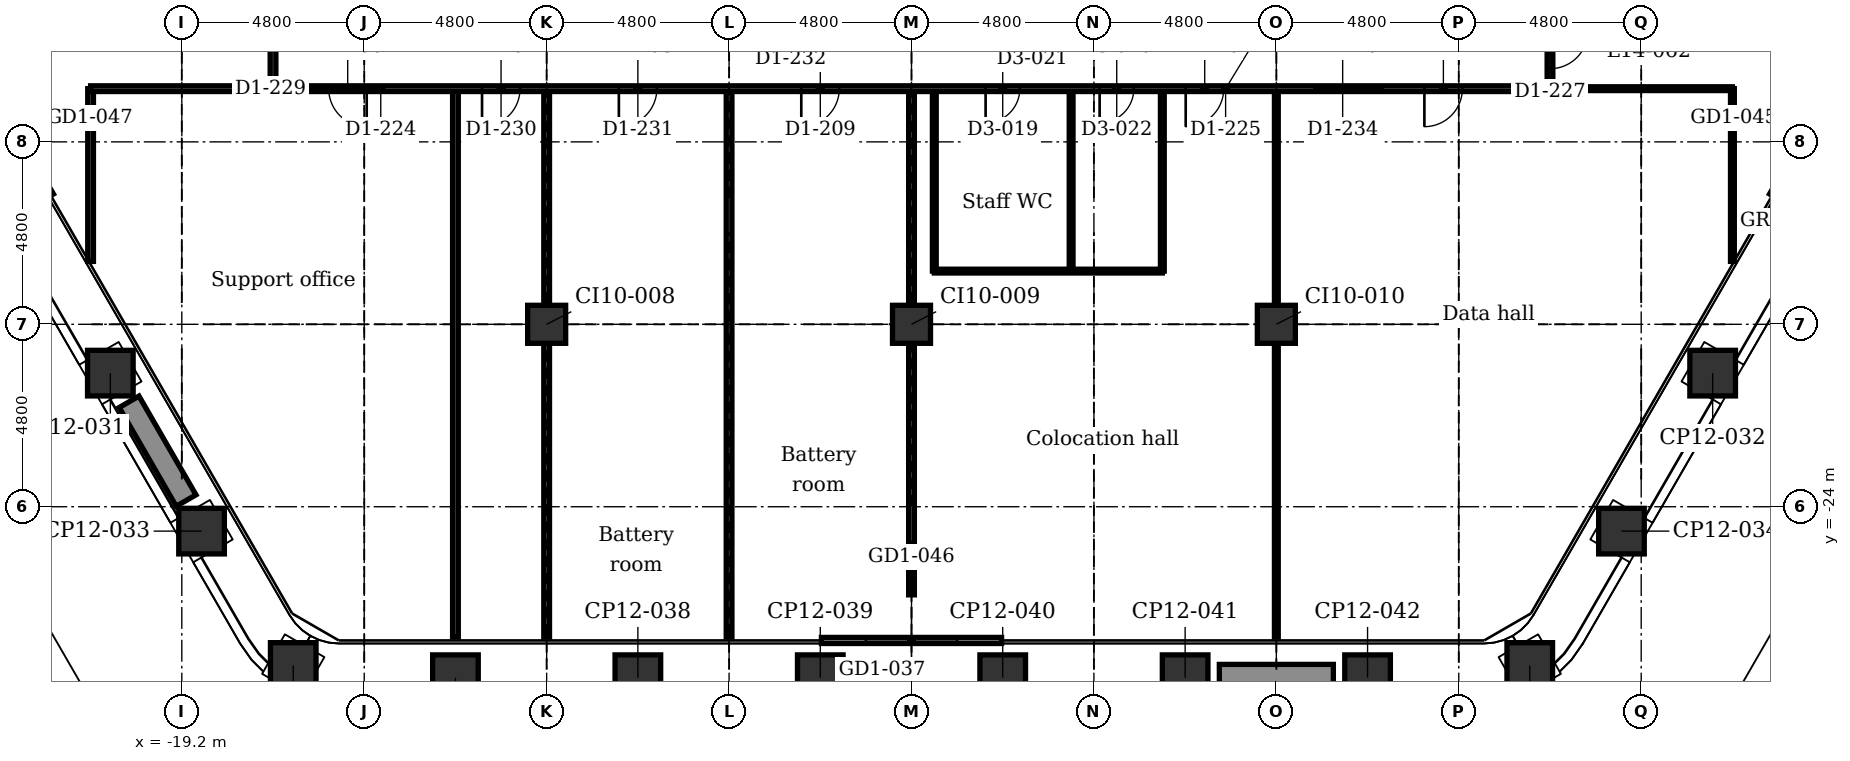
"""IFC4 building model, lengths in metres.
Left out: names, types, materials, properties, quantities, classifications, styles, units other than length and angle.
Written with IfcOpenShell. Run it as: python <this file> out.ifc"""

import sys

from ifc_helpers import new_model, si_unit, direction, frame, frame_2d, origin, origin_2d, place, context, subcontext, project, spatial, rectangle, extrude, element, fill, save


model = new_model("IFC4")
c1 = context("Model", 3, precision=1e-05, world=origin(), true_north=direction((0.0, 1.0)))
c2 = subcontext(c1, "Body", "Model", "MODEL_VIEW")
j1 = project(units=[si_unit("LENGTHUNIT", "METRE"), si_unit("PLANEANGLEUNIT", "RADIAN")], contexts=[c1])
p1 = place(None, origin())
s1 = spatial("IfcSite", under=j1, at=p1, CompositionType="ELEMENT")
p2 = place(p1, origin())
s2 = spatial("IfcBuilding", under=s1, at=p2, CompositionType="ELEMENT")
p3 = place(p2, frame((0.0, 0.0, 77.9)))
s3 = spatial("IfcBuildingStorey", under=s2, at=p3, CompositionType="ELEMENT", Elevation=77.9)
for number, where, z_axis, x_axis in (
    (1, (21.08, -20.485, -0.2), (0.0, 0.0, 1.0), (0.5, 0.866, 0.0)),
    (2, (18.68, -24.642, -0.2), (0.0, 0.0, 1.0), (0.5, 0.866, 0.0)),
    (3, (16.268, -28.177, -0.2), (0.0, 0.0, 1.0), (0.866, 0.5, 0.0)),
    (4, (12.0, -28.499, -0.2), (0.0, 0.0, 1.0), (1.0, 0.0, 0.0)),
    (5, (7.2, -28.499, -0.2), (0.0, 0.0, 1.0), (1.0, 0.0, 0.0)),
    (6, (2.4, -28.499, -0.2), (0.0, 0.0, 1.0), (1.0, 0.0, 0.0)),
    (7, (-2.4, -28.499, -0.2), (0.0, 0.0, 1.0), (1.0, 0.0, 0.0)),
    (8, (-7.2, -28.499, -0.2), (0.0, 0.0, 1.0), (1.0, 0.0, 0.0)),
    (9, (-12.0, -28.499, -0.2), (0.0, 0.0, 1.0), (1.0, 0.0, 0.0)),
    (10, (-16.268, -28.177, -0.2), (0.0, 0.0, 1.0), (0.5, 0.866, 0.0)),
    (11, (-18.68, -24.642, -0.2), (0.0, 0.0, 1.0), (0.866, 0.5, 0.0)),
    (12, (-21.08, -20.485, -0.2), (0.0, 0.0, 1.0), (0.866, 0.5, 0.0)),
):
    element("IfcColumn", number, at=place(p3, frame(where, z_axis=z_axis, x_axis=x_axis)), inside=s3, PredefinedType="COLUMN", context=c2, shape_type="SweptSolid", body=[
        extrude(rectangle(XDim=1.2, YDim=1.2, at=origin_2d()), origin(), (0.0, 0.0, 1.0), 4.5),
    ])
for number, where, z_axis, x_axis in (
    (13, (-9.6, -19.2, -0.2), (0.0, 0.0, 1.0), (1.0, 0.0, 0.0)),
    (14, (0.0, -19.2, -0.2), (0.0, 0.0, 1.0), (1.0, 0.0, 0.0)),
    (15, (9.6, -19.2, -0.2), (0.0, 0.0, 1.0), (1.0, 0.0, 0.0)),
):
    element("IfcColumn", number, at=place(p3, frame(where, z_axis=z_axis, x_axis=x_axis)), inside=s3, PredefinedType="COLUMN", context=c2, shape_type="SweptSolid", body=[
        extrude(rectangle(XDim=1.0, YDim=1.0, at=origin_2d()), origin(), (0.0, 0.0, 1.0), 4.5),
    ])
p4 = place(p3, frame((25.017, -11.707, 0.0), z_axis=(0.0, 0.0, 1.0), x_axis=(-0.499978080042, -0.866038058908, 0.0)))
e16 = element("IfcWall", 16, at=p4, inside=s3, PredefinedType="PARTITIONING", context=c2, shape_type="SweptSolid", body=[
    extrude(rectangle(XDim=4.74, YDim=0.16, at=frame_2d((2.37, 0.0))), origin(), (0.0, 0.0, 1.0), 4.3),
])
p5 = place(p4, frame((1.17, 0.0, 0.0)))
e17 = element("IfcOpeningElement", 17, at=p5, cuts=e16, PredefinedType="OPENING", context=c2, shape_type="SweptSolid", body=[
    extrude(rectangle(XDim=2.4, YDim=2.4, at=frame_2d((1.2, 1.2))), frame((0.0, 0.09, 0.0), z_axis=(0.0, -1.0, 0.0), x_axis=(1.0, 0.0, 0.0)), (0.0, 0.0, 1.0), 0.18),
])
p6 = place(p3, frame((2.37, -27.519, 0.0), z_axis=(0.0, 0.0, 1.0), x_axis=(-1.0, 0.0, 0.0)))
e18 = element("IfcWall", 18, at=p6, inside=s3, PredefinedType="PARTITIONING", context=c2, shape_type="SweptSolid", body=[
    extrude(rectangle(XDim=4.74, YDim=0.16, at=frame_2d((2.37, 0.0))), origin(), (0.0, 0.0, 1.0), 4.3),
])
p7 = place(p6, frame((1.17, 0.0, 0.0)))
e19 = element("IfcOpeningElement", 19, at=p7, cuts=e18, PredefinedType="OPENING", context=c2, shape_type="SweptSolid", body=[
    extrude(rectangle(XDim=2.4, YDim=2.4, at=frame_2d((1.2, 1.2))), frame((0.0, 0.09, 0.0), z_axis=(0.0, -1.0, 0.0), x_axis=(1.0, 0.0, 0.0)), (0.0, 0.0, 1.0), 0.18),
])
p8 = place(p3, frame((-22.647, -15.812, 0.0), z_axis=(0.0, 0.0, 1.0), x_axis=(-0.499978080042, 0.866038058908, 0.0)))
e20 = element("IfcWall", 20, at=p8, inside=s3, PredefinedType="PARTITIONING", context=c2, shape_type="SweptSolid", body=[
    extrude(rectangle(XDim=4.74, YDim=0.16, at=frame_2d((2.37, 0.0))), origin(), (0.0, 0.0, 1.0), 4.3),
])
p9 = place(p8, frame((1.17, 0.0, 0.0)))
e21 = element("IfcOpeningElement", 21, at=p9, cuts=e20, PredefinedType="OPENING", context=c2, shape_type="SweptSolid", body=[
    extrude(rectangle(XDim=2.4, YDim=2.4, at=frame_2d((1.2, 1.2))), frame((0.0, 0.09, 0.0), z_axis=(0.0, -1.0, 0.0), x_axis=(1.0, 0.0, 0.0)), (0.0, 0.0, 1.0), 0.18),
])
for number, where, z_axis, x_axis in (
    (22, (11.1, -28.448, 0.0), (0.0, 0.0, 1.0), (-1.0, 0.0, 0.0)),
    (23, (-19.087, -23.837, 0.0), (0.0, 0.0, 1.0), (-0.5, 0.866, 0.0)),
):
    element("IfcWall", number, at=place(p3, frame(where, z_axis=z_axis, x_axis=x_axis)), inside=s3, PredefinedType="USERDEFINED", context=c2, shape_type="SweptSolid", body=[
        extrude(rectangle(XDim=3.0, YDim=0.6, at=frame_2d((1.5, 0.0))), origin(), (0.0, 0.0, 1.0), 0.7),
    ])
p10 = place(p3, frame((21.6, -17.545, 0.0), z_axis=(0.0, 0.0, 1.0), x_axis=(0.0, 1.0, 0.0)))
e24 = element("IfcWall", 24, at=p10, inside=s3, PredefinedType="PARTITIONING", context=c2, shape_type="SweptSolid", body=[
    extrude(rectangle(XDim=4.545, YDim=0.1, at=frame_2d((2.272, 0.0))), origin(), (0.0, 0.0, 1.0), 4.3),
])
p11 = place(p3, frame((16.8, -13.0, 0.0), z_axis=(0.0, 0.0, 1.0), x_axis=(0.0, 1.0, 0.0)))
e25 = element("IfcWall", 25, at=p11, inside=s3, PredefinedType="PARTITIONING", context=c2, shape_type="SweptSolid", body=[
    extrude(rectangle(XDim=9.05, YDim=0.15, at=frame_2d((4.525, 0.0))), origin(), (0.0, 0.0, 1.0), 4.3),
])
p12 = place(p11, frame((0.525, 0.0, 0.0)))
e26 = element("IfcOpeningElement", 26, at=p12, cuts=e25, PredefinedType="OPENING", context=c2, shape_type="SweptSolid", body=[
    extrude(rectangle(XDim=1.0, YDim=2.1, at=frame_2d((0.5, 1.05))), frame((0.0, 0.085, 0.0), z_axis=(0.0, -1.0, 0.0), x_axis=(1.0, 0.0, 0.0)), (0.0, 0.0, 1.0), 0.17),
])
p13 = place(p11, frame((5.8, 0.0, 0.0)))
e27 = element("IfcOpeningElement", 27, at=p13, cuts=e25, PredefinedType="OPENING", context=c2, shape_type="SweptSolid", body=[
    extrude(rectangle(XDim=1.0, YDim=2.1, at=frame_2d((0.5, 1.05))), frame((0.0, 0.085, 0.0), z_axis=(0.0, -1.0, 0.0), x_axis=(1.0, 0.0, 0.0)), (0.0, 0.0, 1.0), 0.17),
])
p14 = place(p3, frame((9.6, -27.428, 0.0), z_axis=(0.0, 0.0, 1.0), x_axis=(0.0, 1.0, 0.0)))
e28 = element("IfcWall", 28, at=p14, inside=s3, PredefinedType="PARTITIONING", context=c2, shape_type="SweptSolid", body=[
    extrude(rectangle(XDim=7.729, YDim=0.1, at=frame_2d((3.864, 0.0))), origin(), (0.0, 0.0, 1.0), 3.843),
])
p15 = place(p3, frame((9.6, -18.7, 0.0), z_axis=(0.0, 0.0, 1.0), x_axis=(0.0, 1.0, 0.0)))
e29 = element("IfcWall", 29, at=p15, inside=s3, PredefinedType="PARTITIONING", context=c2, shape_type="SweptSolid", body=[
    extrude(rectangle(XDim=5.7, YDim=0.1, at=frame_2d((2.85, 0.0))), origin(), (0.0, 0.0, 1.0), 3.843),
])
for number, where, z_axis, x_axis in (
    (30, (6.6, -17.8, 0.0), (0.0, 0.0, 1.0), (0.0, 1.0, 0.0)),
    (31, (4.2, -17.8, 0.0), (0.0, 0.0, 1.0), (0.0, 1.0, 0.0)),
    (32, (0.6, -17.8, 0.0), (0.0, 0.0, 1.0), (0.0, 1.0, 0.0)),
):
    element("IfcWall", number, at=place(p3, frame(where, z_axis=z_axis, x_axis=x_axis)), inside=s3, PredefinedType="PARTITIONING", context=c2, shape_type="SweptSolid", body=[
        extrude(rectangle(XDim=4.8, YDim=0.1, at=frame_2d((2.4, 0.0))), origin(), (0.0, 0.0, 1.0), 4.3),
    ])
p16 = place(p3, frame((0.0, -26.319, 0.0), z_axis=(0.0, 0.0, 1.0), x_axis=(0.0, 1.0, 0.0)))
e33 = element("IfcWall", 33, at=p16, inside=s3, PredefinedType="PARTITIONING", context=c2, shape_type="SweptSolid", body=[
    extrude(rectangle(XDim=6.619, YDim=0.15, at=frame_2d((3.309, 0.0))), origin(), (0.0, 0.0, 1.0), 3.843),
])
p17 = place(p3, frame((0.0, -18.7, 0.0), z_axis=(0.0, 0.0, 1.0), x_axis=(0.0, 1.0, 0.0)))
e34 = element("IfcWall", 34, at=p17, inside=s3, PredefinedType="PARTITIONING", context=c2, shape_type="SweptSolid", body=[
    extrude(rectangle(XDim=5.7, YDim=0.15, at=frame_2d((2.85, 0.0))), origin(), (0.0, 0.0, 1.0), 3.843),
])
p18 = place(p3, frame((-4.8, -27.428, 0.0), z_axis=(0.0, 0.0, 1.0), x_axis=(0.0, 1.0, 0.0)))
e35 = element("IfcWall", 35, at=p18, inside=s3, PredefinedType="PARTITIONING", context=c2, shape_type="SweptSolid", body=[
    extrude(rectangle(XDim=14.428, YDim=0.15, at=frame_2d((7.214, 0.0))), origin(), (0.0, 0.0, 1.0), 3.843),
])
p19 = place(p3, frame((-9.6, -27.428, 0.0), z_axis=(0.0, 0.0, 1.0), x_axis=(0.0, 1.0, 0.0)))
e36 = element("IfcWall", 36, at=p19, inside=s3, PredefinedType="PARTITIONING", context=c2, shape_type="SweptSolid", body=[
    extrude(rectangle(XDim=7.729, YDim=0.15, at=frame_2d((3.864, 0.0))), origin(), (0.0, 0.0, 1.0), 3.843),
])
p20 = place(p3, frame((-9.6, -18.7, 0.0), z_axis=(0.0, 0.0, 1.0), x_axis=(0.0, 1.0, 0.0)))
e37 = element("IfcWall", 37, at=p20, inside=s3, PredefinedType="PARTITIONING", context=c2, shape_type="SweptSolid", body=[
    extrude(rectangle(XDim=5.7, YDim=0.15, at=frame_2d((2.85, 0.0))), origin(), (0.0, 0.0, 1.0), 3.843),
])
p21 = place(p3, frame((-12.0, -27.428, 0.0), z_axis=(0.0, 0.0, 1.0), x_axis=(0.0, 1.0, 0.0)))
e38 = element("IfcWall", 38, at=p21, inside=s3, PredefinedType="PARTITIONING", context=c2, shape_type="SweptSolid", body=[
    extrude(rectangle(XDim=14.428, YDim=0.15, at=frame_2d((7.214, 0.0))), origin(), (0.0, 0.0, 1.0), 4.3),
])
p22 = place(p3, frame((-16.8, -13.0, 0.0), z_axis=(0.0, 0.0, 1.0), x_axis=(0.0, 1.0, 0.0)))
e39 = element("IfcWall", 39, at=p22, inside=s3, PredefinedType="PARTITIONING", context=c2, shape_type="SweptSolid", body=[
    extrude(rectangle(XDim=9.05, YDim=0.15, at=frame_2d((4.525, 0.0))), origin(), (0.0, 0.0, 1.0), 4.3),
])
p23 = place(p22, frame((1.0, 0.0, 0.0)))
e40 = element("IfcOpeningElement", 40, at=p23, cuts=e39, PredefinedType="OPENING", context=c2, shape_type="SweptSolid", body=[
    extrude(rectangle(XDim=1.0, YDim=2.1, at=frame_2d((0.5, 1.05))), frame((0.0, 0.085, 0.0), z_axis=(0.0, -1.0, 0.0), x_axis=(1.0, 0.0, 0.0)), (0.0, 0.0, 1.0), 0.17),
])
p24 = place(p22, frame((5.8, 0.0, 0.0)))
e41 = element("IfcOpeningElement", 41, at=p24, cuts=e39, PredefinedType="OPENING", context=c2, shape_type="SweptSolid", body=[
    extrude(rectangle(XDim=1.0, YDim=2.1, at=frame_2d((0.5, 1.05))), frame((0.0, 0.085, 0.0), z_axis=(0.0, -1.0, 0.0), x_axis=(1.0, 0.0, 0.0)), (0.0, 0.0, 1.0), 0.17),
])
p25 = place(p3, frame((-21.6, -17.545, 0.0), z_axis=(0.0, 0.0, 1.0), x_axis=(0.0, 1.0, 0.0)))
e42 = element("IfcWall", 42, at=p25, inside=s3, PredefinedType="PARTITIONING", context=c2, shape_type="SweptSolid", body=[
    extrude(rectangle(XDim=4.545, YDim=0.15, at=frame_2d((2.272, 0.0))), origin(), (0.0, 0.0, 1.0), 4.3),
])
p26 = place(p3, frame((0.6, -17.8, 0.0), z_axis=(0.0, 0.0, 1.0), x_axis=(1.0, 0.0, 0.0)))
e43 = element("IfcWall", 43, at=p26, inside=s3, PredefinedType="PARTITIONING", context=c2, shape_type="SweptSolid", body=[
    extrude(rectangle(XDim=6.0, YDim=0.1, at=frame_2d((3.0, 0.0))), origin(), (0.0, 0.0, 1.0), 4.3),
])
p27 = place(p3, frame((16.8, -13.0, 0.0), z_axis=(0.0, 0.0, 1.0), x_axis=(1.0, 0.0, 0.0)))
e44 = element("IfcWall", 44, at=p27, inside=s3, PredefinedType="PARTITIONING", context=c2, shape_type="SweptSolid", body=[
    extrude(rectangle(XDim=4.8, YDim=0.1, at=frame_2d((2.4, 0.0))), origin(), (0.0, 0.0, 1.0), 4.3),
])
p28 = place(p3, frame((-21.6, -13.0, 0.0), z_axis=(0.0, 0.0, 1.0), x_axis=(1.0, 0.0, 0.0)))
e45 = element("IfcWall", 45, at=p28, inside=s3, PredefinedType="PARTITIONING", context=c2, shape_type="SweptSolid", body=[
    extrude(rectangle(XDim=38.4, YDim=0.15, at=frame_2d((19.2, 0.0))), origin(), (0.0, 0.0, 1.0), 4.3),
])
p29 = place(p28, frame((6.265, 0.0, 0.0)))
e46 = element("IfcOpeningElement", 46, at=p29, cuts=e45, PredefinedType="OPENING", context=c2, shape_type="SweptSolid", body=[
    extrude(rectangle(XDim=1.0, YDim=2.1, at=frame_2d((0.5, 1.05))), frame((0.0, 0.085, 0.0), z_axis=(0.0, -1.0, 0.0), x_axis=(1.0, 0.0, 0.0)), (0.0, 0.0, 1.0), 0.17),
])
p30 = place(p28, frame((10.3, 0.0, 0.0)))
e47 = element("IfcOpeningElement", 47, at=p30, cuts=e45, PredefinedType="OPENING", context=c2, shape_type="SweptSolid", body=[
    extrude(rectangle(XDim=1.0, YDim=2.1, at=frame_2d((0.5, 1.05))), frame((0.0, 0.085, 0.0), z_axis=(0.0, -1.0, 0.0), x_axis=(1.0, 0.0, 0.0)), (0.0, 0.0, 1.0), 0.17),
])
p31 = place(p28, frame((13.9, 0.0, 0.0)))
e48 = element("IfcOpeningElement", 48, at=p31, cuts=e45, PredefinedType="OPENING", context=c2, shape_type="SweptSolid", body=[
    extrude(rectangle(XDim=1.0, YDim=2.1, at=frame_2d((0.5, 1.05))), frame((0.0, 0.085, 0.0), z_axis=(0.0, -1.0, 0.0), x_axis=(1.0, 0.0, 0.0)), (0.0, 0.0, 1.0), 0.17),
])
p32 = place(p28, frame((18.7, 0.0, 0.0)))
e49 = element("IfcOpeningElement", 49, at=p32, cuts=e45, PredefinedType="OPENING", context=c2, shape_type="SweptSolid", body=[
    extrude(rectangle(XDim=1.0, YDim=2.1, at=frame_2d((0.5, 1.05))), frame((0.0, 0.085, 0.0), z_axis=(0.0, -1.0, 0.0), x_axis=(1.0, 0.0, 0.0)), (0.0, 0.0, 1.0), 0.17),
])
p33 = place(p28, frame((28.815, 0.0, 0.0)))
e50 = element("IfcOpeningElement", 50, at=p33, cuts=e45, PredefinedType="OPENING", context=c2, shape_type="SweptSolid", body=[
    extrude(rectangle(XDim=1.0, YDim=2.1, at=frame_2d((0.5, 1.05))), frame((0.0, 0.085, 0.0), z_axis=(0.0, -1.0, 0.0), x_axis=(1.0, 0.0, 0.0)), (0.0, 0.0, 1.0), 0.17),
])
p34 = place(p28, frame((35.095, 0.0, 0.0)))
e51 = element("IfcOpeningElement", 51, at=p34, cuts=e45, PredefinedType="OPENING", context=c2, shape_type="SweptSolid", body=[
    extrude(rectangle(XDim=1.0, YDim=2.1, at=frame_2d((0.5, 1.05))), frame((0.0, 0.085, 0.0), z_axis=(0.0, -1.0, 0.0), x_axis=(1.0, 0.0, 0.0)), (0.0, 0.0, 1.0), 0.17),
])
p35 = place(p28, frame((23.55, 0.0, 0.0)))
e52 = element("IfcOpeningElement", 52, at=p35, cuts=e45, PredefinedType="OPENING", context=c2, shape_type="SweptSolid", body=[
    extrude(rectangle(XDim=0.9, YDim=2.1, at=frame_2d((0.45, 1.05))), frame((0.0, 0.085, 0.0), z_axis=(0.0, -1.0, 0.0), x_axis=(1.0, 0.0, 0.0)), (0.0, 0.0, 1.0), 0.17),
])
p36 = place(p28, frame((26.55, 0.0, 0.0)))
e53 = element("IfcOpeningElement", 53, at=p36, cuts=e45, PredefinedType="OPENING", context=c2, shape_type="SweptSolid", body=[
    extrude(rectangle(XDim=0.9, YDim=2.1, at=frame_2d((0.45, 1.05))), frame((0.0, 0.085, 0.0), z_axis=(0.0, -1.0, 0.0), x_axis=(1.0, 0.0, 0.0)), (0.0, 0.0, 1.0), 0.17),
])
p37 = place(p28, frame((32.2, 0.0, 0.9)))
e54 = element("IfcOpeningElement", 54, at=p37, cuts=e45, PredefinedType="OPENING", context=c2, shape_type="SweptSolid", body=[
    extrude(rectangle(XDim=1.8, YDim=1.5, at=frame_2d((0.9, 0.75))), frame((0.0, 0.085, 0.0), z_axis=(0.0, -1.0, 0.0), x_axis=(1.0, 0.0, 0.0)), (0.0, 0.0, 1.0), 0.17),
])
p38 = place(p7, origin())
e55 = element("IfcDoor", 55, at=p38, inside=s3, OperationType="DOUBLE_DOOR_SLIDING", PredefinedType="DOOR", context=c2, shape_type="SweptSolid", body=[
    extrude(rectangle(XDim=2.4, YDim=2.4, at=frame_2d((1.2, 1.2))), frame((0.0, 0.025, 0.0), z_axis=(0.0, -1.0, 0.0), x_axis=(1.0, 0.0, 0.0)), (0.0, 0.0, 1.0), 0.05),
])
fill(e19, e55)
p39 = place(p29, frame((1.0, 0.0, 0.0), z_axis=(0.0, 0.0, 1.0), x_axis=(-1.0, 0.0, 0.0)))
e56 = element("IfcDoor", 56, at=p39, inside=s3, OperationType="SINGLE_SWING_RIGHT", PredefinedType="DOOR", context=c2, shape_type="SweptSolid", body=[
    extrude(rectangle(XDim=1.0, YDim=2.1, at=frame_2d((0.5, 1.05))), frame((0.0, 0.025, 0.0), z_axis=(0.0, -1.0, 0.0), x_axis=(1.0, 0.0, 0.0)), (0.0, 0.0, 1.0), 0.05),
])
fill(e46, e56)
p40 = place(p30, frame((1.0, 0.0, 0.0), z_axis=(0.0, 0.0, 1.0), x_axis=(-1.0, 0.0, 0.0)))
e57 = element("IfcDoor", 57, at=p40, inside=s3, OperationType="SINGLE_SWING_LEFT", PredefinedType="DOOR", context=c2, shape_type="SweptSolid", body=[
    extrude(rectangle(XDim=1.0, YDim=2.1, at=frame_2d((0.5, 1.05))), frame((0.0, 0.025, 0.0), z_axis=(0.0, -1.0, 0.0), x_axis=(1.0, 0.0, 0.0)), (0.0, 0.0, 1.0), 0.05),
])
fill(e47, e57)
p41 = place(p31, frame((1.0, 0.0, 0.0), z_axis=(0.0, 0.0, 1.0), x_axis=(-1.0, 0.0, 0.0)))
e58 = element("IfcDoor", 58, at=p41, inside=s3, OperationType="SINGLE_SWING_LEFT", PredefinedType="DOOR", context=c2, shape_type="SweptSolid", body=[
    extrude(rectangle(XDim=1.0, YDim=2.1, at=frame_2d((0.5, 1.05))), frame((0.0, 0.025, 0.0), z_axis=(0.0, -1.0, 0.0), x_axis=(1.0, 0.0, 0.0)), (0.0, 0.0, 1.0), 0.05),
])
fill(e48, e58)
p42 = place(p32, frame((1.0, 0.0, 0.0), z_axis=(0.0, 0.0, 1.0), x_axis=(-1.0, 0.0, 0.0)))
e59 = element("IfcDoor", 59, at=p42, inside=s3, OperationType="SINGLE_SWING_LEFT", PredefinedType="DOOR", context=c2, shape_type="SweptSolid", body=[
    extrude(rectangle(XDim=1.0, YDim=2.1, at=frame_2d((0.5, 1.05))), frame((0.0, 0.025, 0.0), z_axis=(0.0, -1.0, 0.0), x_axis=(1.0, 0.0, 0.0)), (0.0, 0.0, 1.0), 0.05),
])
fill(e49, e59)
p43 = place(p33, frame((1.0, 0.0, 0.0), z_axis=(0.0, 0.0, 1.0), x_axis=(-1.0, 0.0, 0.0)))
e60 = element("IfcDoor", 60, at=p43, inside=s3, OperationType="SINGLE_SWING_LEFT", PredefinedType="DOOR", context=c2, shape_type="SweptSolid", body=[
    extrude(rectangle(XDim=1.0, YDim=2.1, at=frame_2d((0.5, 1.05))), frame((0.0, 0.025, 0.0), z_axis=(0.0, -1.0, 0.0), x_axis=(1.0, 0.0, 0.0)), (0.0, 0.0, 1.0), 0.05),
])
fill(e50, e60)
p44 = place(p34, frame((1.0, 0.0, 0.0), z_axis=(0.0, 0.0, 1.0), x_axis=(-1.0, 0.0, 0.0)))
e61 = element("IfcDoor", 61, at=p44, inside=s3, OperationType="SINGLE_SWING_LEFT", PredefinedType="DOOR", context=c2, shape_type="SweptSolid", body=[
    extrude(rectangle(XDim=1.0, YDim=2.1, at=frame_2d((0.5, 1.05))), frame((0.0, 0.025, 0.0), z_axis=(0.0, -1.0, 0.0), x_axis=(1.0, 0.0, 0.0)), (0.0, 0.0, 1.0), 0.05),
])
fill(e51, e61)
p45 = place(p12, frame((1.0, 0.0, 0.0), z_axis=(0.0, 0.0, 1.0), x_axis=(-1.0, 0.0, 0.0)))
e62 = element("IfcDoor", 62, at=p45, inside=s3, OperationType="SINGLE_SWING_RIGHT", PredefinedType="DOOR", context=c2, shape_type="SweptSolid", body=[
    extrude(rectangle(XDim=1.0, YDim=2.1, at=frame_2d((0.5, 1.05))), frame((0.0, 0.025, 0.0), z_axis=(0.0, -1.0, 0.0), x_axis=(1.0, 0.0, 0.0)), (0.0, 0.0, 1.0), 0.05),
])
fill(e26, e62)
p46 = place(p35, frame((0.9, 0.0, 0.0), z_axis=(0.0, 0.0, 1.0), x_axis=(-1.0, 0.0, 0.0)))
e63 = element("IfcDoor", 63, at=p46, inside=s3, OperationType="SINGLE_SWING_LEFT", PredefinedType="DOOR", context=c2, shape_type="SweptSolid", body=[
    extrude(rectangle(XDim=0.9, YDim=2.1, at=frame_2d((0.45, 1.05))), frame((0.0, 0.025, 0.0), z_axis=(0.0, -1.0, 0.0), x_axis=(1.0, 0.0, 0.0)), (0.0, 0.0, 1.0), 0.05),
])
fill(e52, e63)
p47 = place(p36, frame((0.9, 0.0, 0.0), z_axis=(0.0, 0.0, 1.0), x_axis=(-1.0, 0.0, 0.0)))
e64 = element("IfcDoor", 64, at=p47, inside=s3, OperationType="SINGLE_SWING_LEFT", PredefinedType="DOOR", context=c2, shape_type="SweptSolid", body=[
    extrude(rectangle(XDim=0.9, YDim=2.1, at=frame_2d((0.45, 1.05))), frame((0.0, 0.025, 0.0), z_axis=(0.0, -1.0, 0.0), x_axis=(1.0, 0.0, 0.0)), (0.0, 0.0, 1.0), 0.05),
])
fill(e53, e64)
p48 = place(p37, origin())
e65 = element("IfcWindow", 65, at=p48, inside=s3, PartitioningType="SINGLE_PANEL", PredefinedType="WINDOW", context=c2, shape_type="SweptSolid", body=[
    extrude(rectangle(XDim=1.8, YDim=1.5, at=frame_2d((0.9, 0.75))), frame((0.0, 0.03, 0.0), z_axis=(0.0, -1.0, 0.0), x_axis=(1.0, 0.0, 0.0)), (0.0, 0.0, 1.0), 0.06),
])
fill(e54, e65)
save(model, sys.argv[1])
